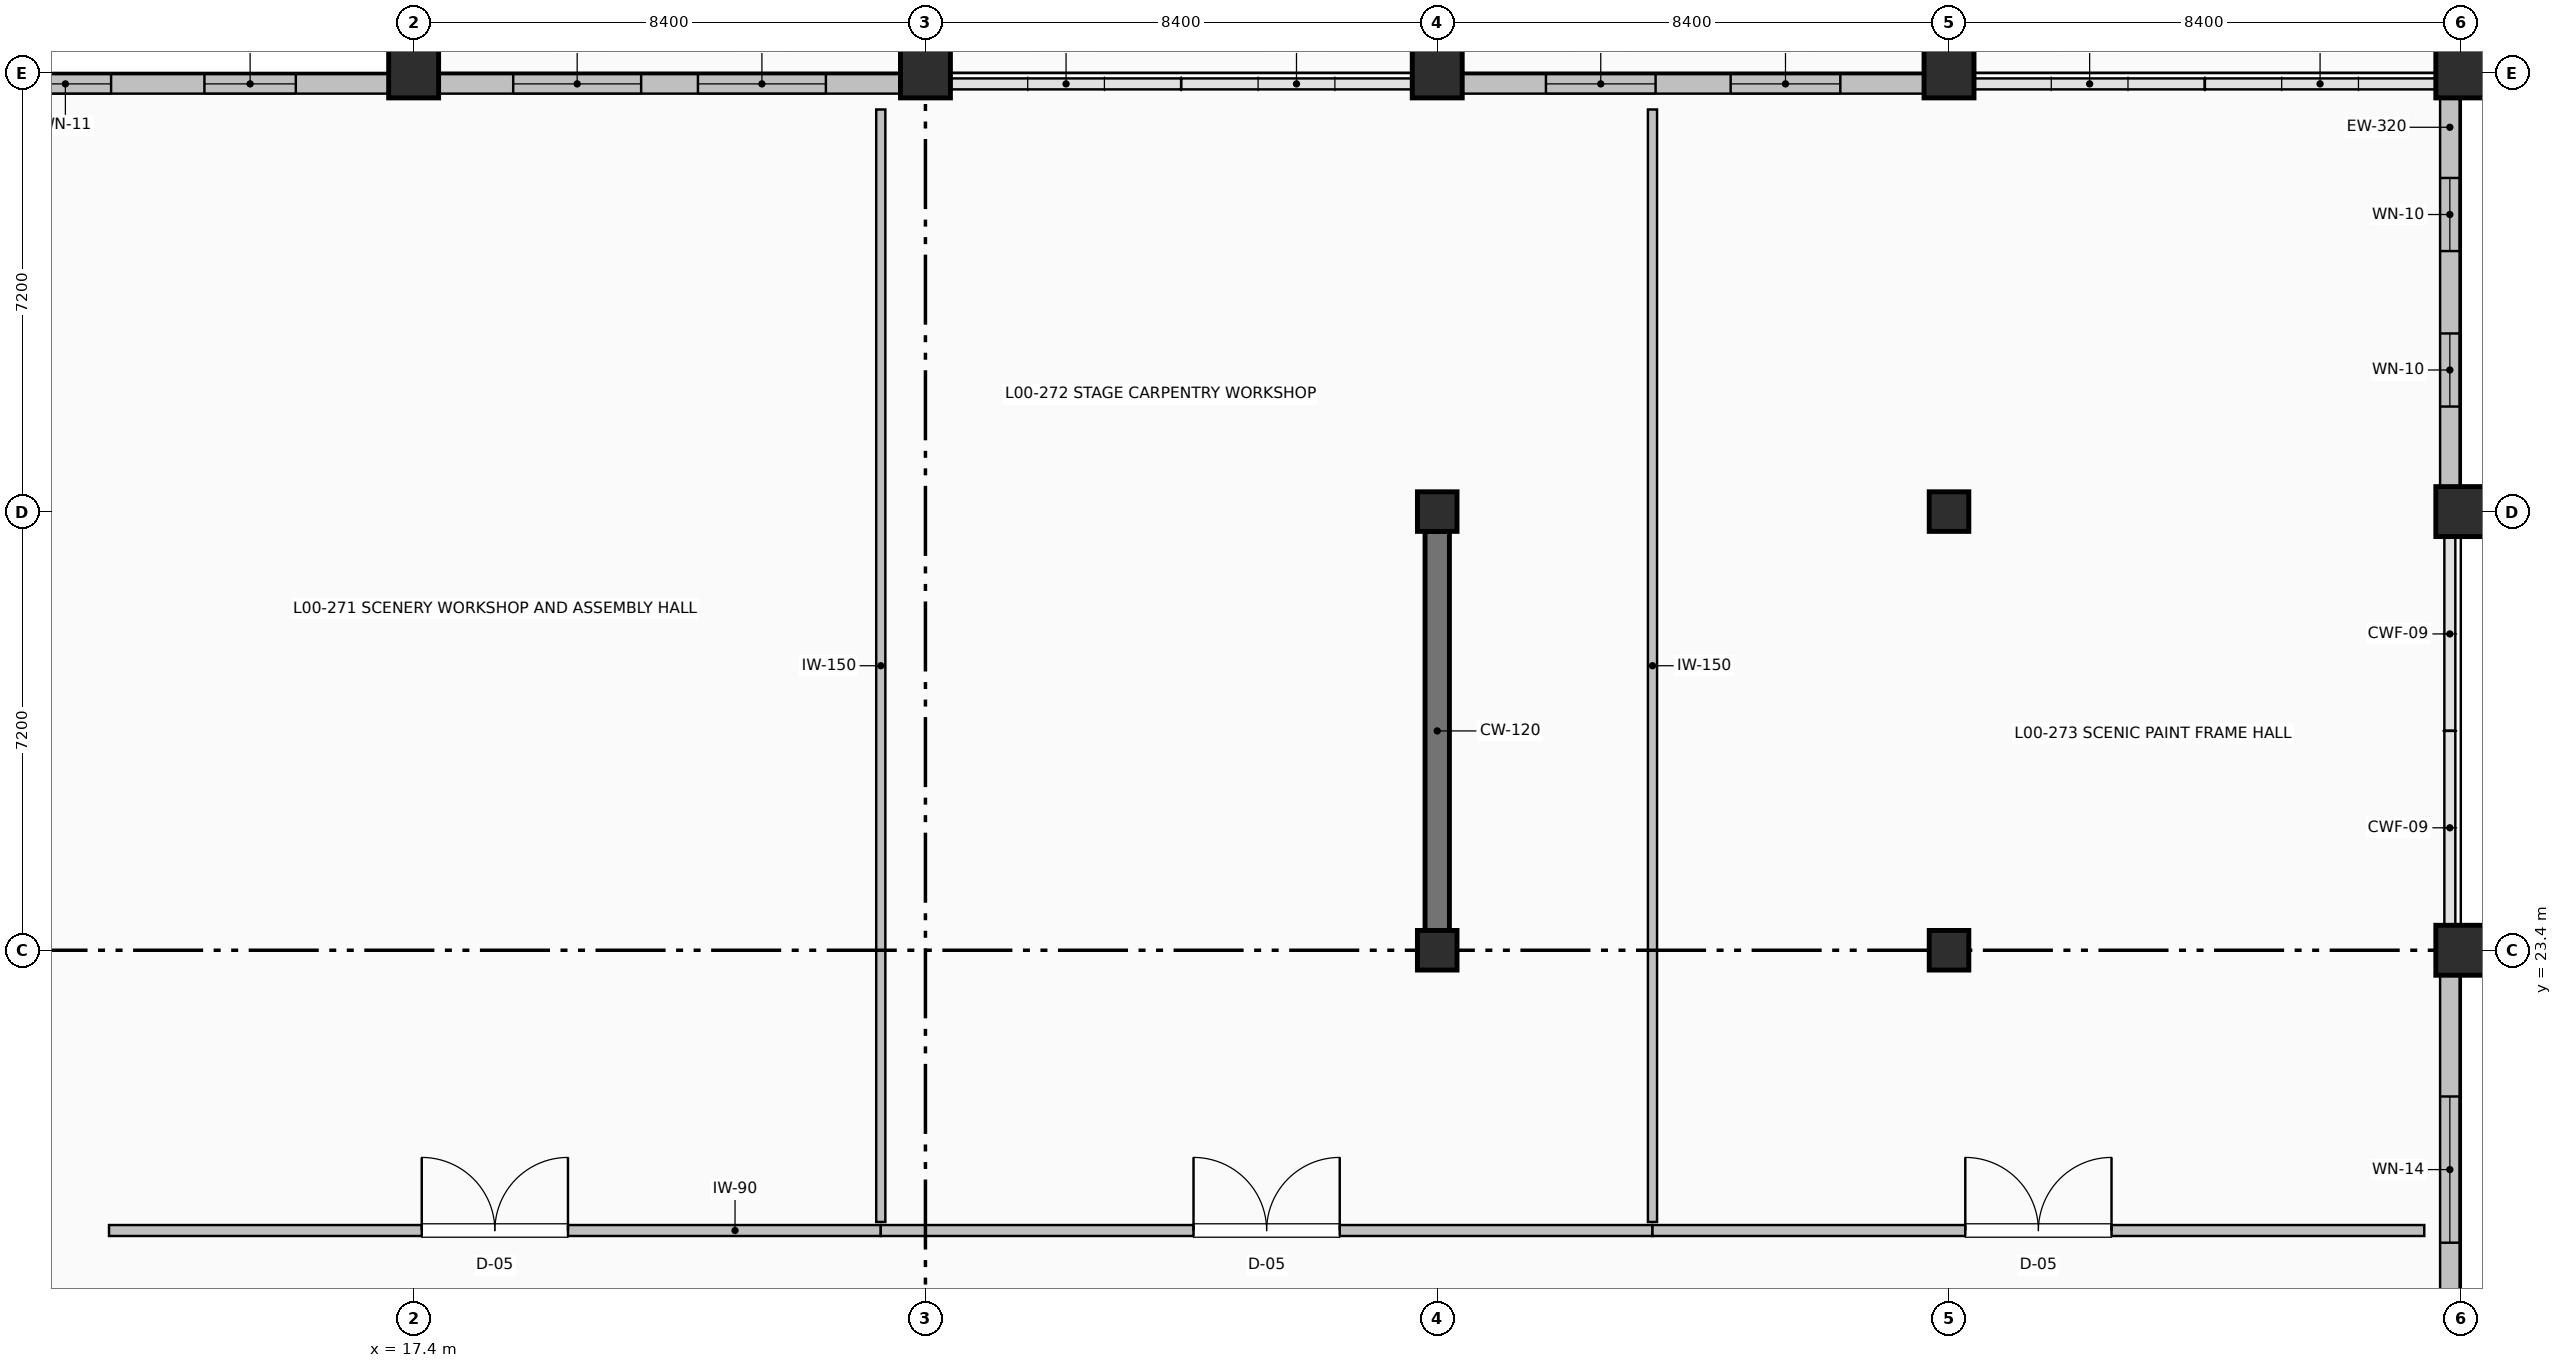
"""IFC4 building model, lengths in metres.
Left out: names, types, materials, properties, quantities, classifications, styles, units other than length and angle.
Written with IfcOpenShell. Run it as: python <this file> out.ifc"""

import sys

from ifc_helpers import new_model, si_unit, direction, frame, frame_2d, origin, origin_2d, place, context, subcontext, project, spatial, rectangle, extrude, element, fill, save


model = new_model("IFC4")
c1 = context("Model", 3, precision=1e-05, world=origin(), true_north=direction((0.0, 1.0)))
c2 = subcontext(c1, "Body", "Model", "MODEL_VIEW")
j1 = project(units=[si_unit("LENGTHUNIT", "METRE"), si_unit("PLANEANGLEUNIT", "RADIAN")], contexts=[c1])
p1 = place(None, origin())
s1 = spatial("IfcSite", under=j1, at=p1, CompositionType="ELEMENT")
p2 = place(p1, origin())
s2 = spatial("IfcBuilding", under=s1, at=p2, CompositionType="ELEMENT")
p3 = place(p2, origin())
s3 = spatial("IfcBuildingStorey", under=s2, at=p3, CompositionType="ELEMENT", Elevation=0.0)
for number, where, z_axis, x_axis in (
    (1, (17.4, 37.8, 0.0), (0.0, 0.0, 1.0), (1.0, 0.0, 0.0)),
    (2, (25.8, 37.8, 0.0), (0.0, 0.0, 1.0), (1.0, 0.0, 0.0)),
):
    element("IfcColumn", number, at=place(p3, frame(where, z_axis=z_axis, x_axis=x_axis)), inside=s3, PredefinedType="COLUMN", context=c2, shape_type="SweptSolid", body=[
        extrude(rectangle(XDim=0.82, YDim=0.82, at=origin_2d()), origin(), (0.0, 0.0, 1.0), 5.4),
    ])
for number, where, z_axis, x_axis in (
    (3, (34.2, 23.4, 0.0), (0.0, 0.0, 1.0), (1.0, 0.0, 0.0)),
    (4, (34.2, 30.6, 0.0), (0.0, 0.0, 1.0), (1.0, 0.0, 0.0)),
):
    element("IfcColumn", number, at=place(p3, frame(where, z_axis=z_axis, x_axis=x_axis)), inside=s3, PredefinedType="COLUMN", context=c2, shape_type="SweptSolid", body=[
        extrude(rectangle(XDim=0.65, YDim=0.65, at=origin_2d()), origin(), (0.0, 0.0, 1.0), 5.4),
    ])
p4 = place(p3, frame((34.2, 37.8, 0.0), z_axis=(0.0, 0.0, 1.0), x_axis=(1.0, 0.0, 0.0)))
e5 = element("IfcColumn", 5, at=p4, inside=s3, PredefinedType="COLUMN", context=c2, shape_type="SweptSolid", body=[
    extrude(rectangle(XDim=0.82, YDim=0.82, at=origin_2d()), origin(), (0.0, 0.0, 1.0), 5.4),
])
for number, where, z_axis, x_axis in (
    (6, (42.6, 23.4, 0.0), (0.0, 0.0, 1.0), (1.0, 0.0, 0.0)),
    (7, (42.6, 30.6, 0.0), (0.0, 0.0, 1.0), (1.0, 0.0, 0.0)),
):
    element("IfcColumn", number, at=place(p3, frame(where, z_axis=z_axis, x_axis=x_axis)), inside=s3, PredefinedType="COLUMN", context=c2, shape_type="SweptSolid", body=[
        extrude(rectangle(XDim=0.65, YDim=0.65, at=origin_2d()), origin(), (0.0, 0.0, 1.0), 5.4),
    ])
for number, where, z_axis, x_axis in (
    (8, (42.6, 37.8, 0.0), (0.0, 0.0, 1.0), (1.0, 0.0, 0.0)),
    (9, (51.0, 23.4, 0.0), (0.0, 0.0, 1.0), (1.0, 0.0, 0.0)),
    (10, (51.0, 30.6, 0.0), (0.0, 0.0, 1.0), (1.0, 0.0, 0.0)),
    (11, (51.0, 37.8, 0.0), (0.0, 0.0, 1.0), (1.0, 0.0, 0.0)),
):
    element("IfcColumn", number, at=place(p3, frame(where, z_axis=z_axis, x_axis=x_axis)), inside=s3, PredefinedType="COLUMN", context=c2, shape_type="SweptSolid", body=[
        extrude(rectangle(XDim=0.82, YDim=0.82, at=origin_2d()), origin(), (0.0, 0.0, 1.0), 5.4),
    ])
p5 = place(p3, frame((34.2, 23.725, 0.0), z_axis=(0.0, 0.0, 1.0), x_axis=(0.0, 1.0, 0.0)))
e12 = element("IfcWall", 12, at=p5, inside=s3, PredefinedType="SHEAR", context=c2, shape_type="SweptSolid", body=[
    extrude(rectangle(XDim=6.55, YDim=0.4, at=frame_2d((3.275, 0.0))), origin(), (0.0, 0.0, 1.0), 5.08),
])
p6 = place(p3, frame((9.41, 37.62, 0.0), z_axis=(0.0, 0.0, 1.0), x_axis=(1.0, 0.0, 0.0)))
e13 = element("IfcWall", 13, at=p6, inside=s3, PredefinedType="SOLIDWALL", context=c2, shape_type="SweptSolid", body=[
    extrude(rectangle(XDim=7.58, YDim=0.32, at=frame_2d((3.79, 0.0))), origin(), (0.0, 0.0, 1.0), 4.242),
])
p7 = place(p6, frame((1.524, 0.0, 0.95)))
e14 = element("IfcOpeningElement", 14, at=p7, cuts=e13, PredefinedType="OPENING", context=c2, shape_type="SweptSolid", body=[
    extrude(rectangle(XDim=1.5, YDim=1.9, at=frame_2d((0.75, 0.95))), frame((0.0, 0.17, 0.0), z_axis=(0.0, -1.0, 0.0), x_axis=(1.0, 0.0, 0.0)), (0.0, 0.0, 1.0), 0.34),
])
p8 = place(p6, frame((4.556, 0.0, 0.95)))
e15 = element("IfcOpeningElement", 15, at=p8, cuts=e13, PredefinedType="OPENING", context=c2, shape_type="SweptSolid", body=[
    extrude(rectangle(XDim=1.5, YDim=1.9, at=frame_2d((0.75, 0.95))), frame((0.0, 0.17, 0.0), z_axis=(0.0, -1.0, 0.0), x_axis=(1.0, 0.0, 0.0)), (0.0, 0.0, 1.0), 0.34),
])
p9 = place(p3, frame((17.81, 37.62, 0.0), z_axis=(0.0, 0.0, 1.0), x_axis=(1.0, 0.0, 0.0)))
e16 = element("IfcWall", 16, at=p9, inside=s3, PredefinedType="SOLIDWALL", context=c2, shape_type="SweptSolid", body=[
    extrude(rectangle(XDim=7.58, YDim=0.32, at=frame_2d((3.79, 0.0))), origin(), (0.0, 0.0, 1.0), 4.242),
])
p10 = place(p9, frame((1.224, 0.0, 0.95)))
e17 = element("IfcOpeningElement", 17, at=p10, cuts=e16, PredefinedType="OPENING", context=c2, shape_type="SweptSolid", body=[
    extrude(rectangle(XDim=2.1, YDim=1.9, at=frame_2d((1.05, 0.95))), frame((0.0, 0.17, 0.0), z_axis=(0.0, -1.0, 0.0), x_axis=(1.0, 0.0, 0.0)), (0.0, 0.0, 1.0), 0.34),
])
p11 = place(p9, frame((4.256, 0.0, 0.95)))
e18 = element("IfcOpeningElement", 18, at=p11, cuts=e16, PredefinedType="OPENING", context=c2, shape_type="SweptSolid", body=[
    extrude(rectangle(XDim=2.1, YDim=1.9, at=frame_2d((1.05, 0.95))), frame((0.0, 0.17, 0.0), z_axis=(0.0, -1.0, 0.0), x_axis=(1.0, 0.0, 0.0)), (0.0, 0.0, 1.0), 0.34),
])
p12 = place(p3, frame((34.61, 37.62, 0.0), z_axis=(0.0, 0.0, 1.0), x_axis=(1.0, 0.0, 0.0)))
e19 = element("IfcWall", 19, at=p12, inside=s3, PredefinedType="SOLIDWALL", context=c2, shape_type="SweptSolid", body=[
    extrude(rectangle(XDim=7.58, YDim=0.32, at=frame_2d((3.79, 0.0))), origin(), (0.0, 0.0, 1.0), 4.242),
])
p13 = place(p12, frame((1.374, 0.0, 0.95)))
e20 = element("IfcOpeningElement", 20, at=p13, cuts=e19, PredefinedType="OPENING", context=c2, shape_type="SweptSolid", body=[
    extrude(rectangle(XDim=1.8, YDim=1.9, at=frame_2d((0.9, 0.95))), frame((0.0, 0.17, 0.0), z_axis=(0.0, -1.0, 0.0), x_axis=(1.0, 0.0, 0.0)), (0.0, 0.0, 1.0), 0.34),
])
p14 = place(p12, frame((4.406, 0.0, 0.95)))
e21 = element("IfcOpeningElement", 21, at=p14, cuts=e19, PredefinedType="OPENING", context=c2, shape_type="SweptSolid", body=[
    extrude(rectangle(XDim=1.8, YDim=1.9, at=frame_2d((0.9, 0.95))), frame((0.0, 0.17, 0.0), z_axis=(0.0, -1.0, 0.0), x_axis=(1.0, 0.0, 0.0)), (0.0, 0.0, 1.0), 0.34),
])
p15 = place(p3, frame((50.82, 37.39, 0.0), z_axis=(0.0, 0.0, 1.0), x_axis=(0.0, -1.0, 0.0)))
e22 = element("IfcWall", 22, at=p15, inside=s3, PredefinedType="SOLIDWALL", context=c2, shape_type="SweptSolid", body=[
    extrude(rectangle(XDim=6.38, YDim=0.32, at=frame_2d((3.19, 0.0))), origin(), (0.0, 0.0, 1.0), 4.342),
])
p16 = place(p15, frame((1.314, 0.0, 0.95)))
e23 = element("IfcOpeningElement", 23, at=p16, cuts=e22, PredefinedType="OPENING", context=c2, shape_type="SweptSolid", body=[
    extrude(rectangle(XDim=1.2, YDim=1.9, at=frame_2d((0.6, 0.95))), frame((0.0, 0.17, 0.0), z_axis=(0.0, -1.0, 0.0), x_axis=(1.0, 0.0, 0.0)), (0.0, 0.0, 1.0), 0.34),
])
p17 = place(p15, frame((3.866, 0.0, 0.95)))
e24 = element("IfcOpeningElement", 24, at=p17, cuts=e22, PredefinedType="OPENING", context=c2, shape_type="SweptSolid", body=[
    extrude(rectangle(XDim=1.2, YDim=1.9, at=frame_2d((0.6, 0.95))), frame((0.0, 0.17, 0.0), z_axis=(0.0, -1.0, 0.0), x_axis=(1.0, 0.0, 0.0)), (0.0, 0.0, 1.0), 0.34),
])
p18 = place(p3, frame((50.82, 22.99, 0.0), z_axis=(0.0, 0.0, 1.0), x_axis=(0.0, -1.0, 0.0)))
e25 = element("IfcWall", 25, at=p18, inside=s3, PredefinedType="SOLIDWALL", context=c2, shape_type="SweptSolid", body=[
    extrude(rectangle(XDim=6.38, YDim=0.32, at=frame_2d((3.19, 0.0))), origin(), (0.0, 0.0, 1.0), 4.342),
])
p19 = place(p18, frame((1.99, 0.0, 0.95)))
e26 = element("IfcOpeningElement", 26, at=p19, cuts=e25, PredefinedType="OPENING", context=c2, shape_type="SweptSolid", body=[
    extrude(rectangle(XDim=2.4, YDim=1.9, at=frame_2d((1.2, 0.95))), frame((0.0, 0.17, 0.0), z_axis=(0.0, -1.0, 0.0), x_axis=(1.0, 0.0, 0.0)), (0.0, 0.0, 1.0), 0.34),
])
p20 = place(p3, frame((12.4, 18.8, 0.0), z_axis=(0.0, 0.0, 1.0), x_axis=(1.0, 0.0, 0.0)))
e27 = element("IfcWall", 27, at=p20, inside=s3, PredefinedType="PARTITIONING", context=c2, shape_type="SweptSolid", body=[
    extrude(rectangle(XDim=12.667, YDim=0.18, at=frame_2d((6.333, 0.0))), origin(), (0.0, 0.0, 1.0), 5.092),
])
p21 = place(p20, frame((5.133, 0.0, 0.0)))
e28 = element("IfcOpeningElement", 28, at=p21, cuts=e27, PredefinedType="OPENING", context=c2, shape_type="SweptSolid", body=[
    extrude(rectangle(XDim=2.4, YDim=2.4, at=frame_2d((1.2, 1.2))), frame((0.0, 0.1, 0.0), z_axis=(0.0, -1.0, 0.0), x_axis=(1.0, 0.0, 0.0)), (0.0, 0.0, 1.0), 0.2),
])
p22 = place(p3, frame((25.067, 18.94, 0.0), z_axis=(0.0, 0.0, 1.0), x_axis=(0.0, 1.0, 0.0)))
e29 = element("IfcWall", 29, at=p22, inside=s3, PredefinedType="PARTITIONING", context=c2, shape_type="SweptSolid", body=[
    extrude(rectangle(XDim=18.26, YDim=0.15, at=frame_2d((9.13, 0.0))), origin(), (0.0, 0.0, 1.0), 5.092),
])
p23 = place(p3, frame((25.067, 18.8, 0.0), z_axis=(0.0, 0.0, 1.0), x_axis=(1.0, 0.0, 0.0)))
e30 = element("IfcWall", 30, at=p23, inside=s3, PredefinedType="PARTITIONING", context=c2, shape_type="SweptSolid", body=[
    extrude(rectangle(XDim=12.666, YDim=0.18, at=frame_2d((6.333, 0.0))), origin(), (0.0, 0.0, 1.0), 5.092),
])
p24 = place(p23, frame((5.133, 0.0, 0.0)))
e31 = element("IfcOpeningElement", 31, at=p24, cuts=e30, PredefinedType="OPENING", context=c2, shape_type="SweptSolid", body=[
    extrude(rectangle(XDim=2.4, YDim=2.4, at=frame_2d((1.2, 1.2))), frame((0.0, 0.1, 0.0), z_axis=(0.0, -1.0, 0.0), x_axis=(1.0, 0.0, 0.0)), (0.0, 0.0, 1.0), 0.2),
])
p25 = place(p3, frame((37.733, 18.94, 0.0), z_axis=(0.0, 0.0, 1.0), x_axis=(0.0, 1.0, 0.0)))
e32 = element("IfcWall", 32, at=p25, inside=s3, PredefinedType="PARTITIONING", context=c2, shape_type="SweptSolid", body=[
    extrude(rectangle(XDim=18.26, YDim=0.15, at=frame_2d((9.13, 0.0))), origin(), (0.0, 0.0, 1.0), 5.092),
])
p26 = place(p3, frame((37.733, 18.8, 0.0), z_axis=(0.0, 0.0, 1.0), x_axis=(1.0, 0.0, 0.0)))
e33 = element("IfcWall", 33, at=p26, inside=s3, PredefinedType="PARTITIONING", context=c2, shape_type="SweptSolid", body=[
    extrude(rectangle(XDim=12.667, YDim=0.18, at=frame_2d((6.333, 0.0))), origin(), (0.0, 0.0, 1.0), 5.092),
])
p27 = place(p26, frame((5.134, 0.0, 0.0)))
e34 = element("IfcOpeningElement", 34, at=p27, cuts=e33, PredefinedType="OPENING", context=c2, shape_type="SweptSolid", body=[
    extrude(rectangle(XDim=2.4, YDim=2.4, at=frame_2d((1.2, 1.2))), frame((0.0, 0.1, 0.0), z_axis=(0.0, -1.0, 0.0), x_axis=(1.0, 0.0, 0.0)), (0.0, 0.0, 1.0), 0.2),
])
p28 = place(p7, origin())
e35 = element("IfcWindow", 35, at=p28, inside=s3, PartitioningType="SINGLE_PANEL", PredefinedType="WINDOW", context=c2, shape_type="SweptSolid", body=[
    extrude(rectangle(XDim=1.5, YDim=1.9, at=frame_2d((0.75, 0.95))), frame((0.0, 0.03, 0.0), z_axis=(0.0, -1.0, 0.0), x_axis=(1.0, 0.0, 0.0)), (0.0, 0.0, 1.0), 0.06),
])
fill(e14, e35)
p29 = place(p8, origin())
e36 = element("IfcWindow", 36, at=p29, inside=s3, PartitioningType="SINGLE_PANEL", PredefinedType="WINDOW", context=c2, shape_type="SweptSolid", body=[
    extrude(rectangle(XDim=1.5, YDim=1.9, at=frame_2d((0.75, 0.95))), frame((0.0, 0.03, 0.0), z_axis=(0.0, -1.0, 0.0), x_axis=(1.0, 0.0, 0.0)), (0.0, 0.0, 1.0), 0.06),
])
fill(e15, e36)
p30 = place(p10, origin())
e37 = element("IfcWindow", 37, at=p30, inside=s3, PartitioningType="SINGLE_PANEL", PredefinedType="WINDOW", context=c2, shape_type="SweptSolid", body=[
    extrude(rectangle(XDim=2.1, YDim=1.9, at=frame_2d((1.05, 0.95))), frame((0.0, 0.03, 0.0), z_axis=(0.0, -1.0, 0.0), x_axis=(1.0, 0.0, 0.0)), (0.0, 0.0, 1.0), 0.06),
])
fill(e17, e37)
p31 = place(p11, origin())
e38 = element("IfcWindow", 38, at=p31, inside=s3, PartitioningType="SINGLE_PANEL", PredefinedType="WINDOW", context=c2, shape_type="SweptSolid", body=[
    extrude(rectangle(XDim=2.1, YDim=1.9, at=frame_2d((1.05, 0.95))), frame((0.0, 0.03, 0.0), z_axis=(0.0, -1.0, 0.0), x_axis=(1.0, 0.0, 0.0)), (0.0, 0.0, 1.0), 0.06),
])
fill(e18, e38)
p32 = place(p13, origin())
e39 = element("IfcWindow", 39, at=p32, inside=s3, PartitioningType="SINGLE_PANEL", PredefinedType="WINDOW", context=c2, shape_type="SweptSolid", body=[
    extrude(rectangle(XDim=1.8, YDim=1.9, at=frame_2d((0.9, 0.95))), frame((0.0, 0.03, 0.0), z_axis=(0.0, -1.0, 0.0), x_axis=(1.0, 0.0, 0.0)), (0.0, 0.0, 1.0), 0.06),
])
fill(e20, e39)
p33 = place(p14, origin())
e40 = element("IfcWindow", 40, at=p33, inside=s3, PartitioningType="SINGLE_PANEL", PredefinedType="WINDOW", context=c2, shape_type="SweptSolid", body=[
    extrude(rectangle(XDim=1.8, YDim=1.9, at=frame_2d((0.9, 0.95))), frame((0.0, 0.03, 0.0), z_axis=(0.0, -1.0, 0.0), x_axis=(1.0, 0.0, 0.0)), (0.0, 0.0, 1.0), 0.06),
])
fill(e21, e40)
p34 = place(p16, origin())
e41 = element("IfcWindow", 41, at=p34, inside=s3, PartitioningType="SINGLE_PANEL", PredefinedType="WINDOW", context=c2, shape_type="SweptSolid", body=[
    extrude(rectangle(XDim=1.2, YDim=1.9, at=frame_2d((0.6, 0.95))), frame((0.0, 0.03, 0.0), z_axis=(0.0, -1.0, 0.0), x_axis=(1.0, 0.0, 0.0)), (0.0, 0.0, 1.0), 0.06),
])
fill(e23, e41)
p35 = place(p17, origin())
e42 = element("IfcWindow", 42, at=p35, inside=s3, PartitioningType="SINGLE_PANEL", PredefinedType="WINDOW", context=c2, shape_type="SweptSolid", body=[
    extrude(rectangle(XDim=1.2, YDim=1.9, at=frame_2d((0.6, 0.95))), frame((0.0, 0.03, 0.0), z_axis=(0.0, -1.0, 0.0), x_axis=(1.0, 0.0, 0.0)), (0.0, 0.0, 1.0), 0.06),
])
fill(e24, e42)
p36 = place(p19, origin())
e43 = element("IfcWindow", 43, at=p36, inside=s3, PartitioningType="SINGLE_PANEL", PredefinedType="WINDOW", context=c2, shape_type="SweptSolid", body=[
    extrude(rectangle(XDim=2.4, YDim=1.9, at=frame_2d((1.2, 0.95))), frame((0.0, 0.03, 0.0), z_axis=(0.0, -1.0, 0.0), x_axis=(1.0, 0.0, 0.0)), (0.0, 0.0, 1.0), 0.06),
])
fill(e26, e43)
p37 = place(p21, origin())
e44 = element("IfcDoor", 44, at=p37, inside=s3, OperationType="DOUBLE_DOOR_SINGLE_SWING", PredefinedType="DOOR", context=c2, shape_type="SweptSolid", body=[
    extrude(rectangle(XDim=2.4, YDim=2.4, at=frame_2d((1.2, 1.2))), frame((0.0, 0.025, 0.0), z_axis=(0.0, -1.0, 0.0), x_axis=(1.0, 0.0, 0.0)), (0.0, 0.0, 1.0), 0.05),
])
fill(e28, e44)
p38 = place(p24, origin())
e45 = element("IfcDoor", 45, at=p38, inside=s3, OperationType="DOUBLE_DOOR_SINGLE_SWING", PredefinedType="DOOR", context=c2, shape_type="SweptSolid", body=[
    extrude(rectangle(XDim=2.4, YDim=2.4, at=frame_2d((1.2, 1.2))), frame((0.0, 0.025, 0.0), z_axis=(0.0, -1.0, 0.0), x_axis=(1.0, 0.0, 0.0)), (0.0, 0.0, 1.0), 0.05),
])
fill(e31, e45)
p39 = place(p27, origin())
e46 = element("IfcDoor", 46, at=p39, inside=s3, OperationType="DOUBLE_DOOR_SINGLE_SWING", PredefinedType="DOOR", context=c2, shape_type="SweptSolid", body=[
    extrude(rectangle(XDim=2.4, YDim=2.4, at=frame_2d((1.2, 1.2))), frame((0.0, 0.025, 0.0), z_axis=(0.0, -1.0, 0.0), x_axis=(1.0, 0.0, 0.0)), (0.0, 0.0, 1.0), 0.05),
])
fill(e34, e46)
save(model, sys.argv[1])
